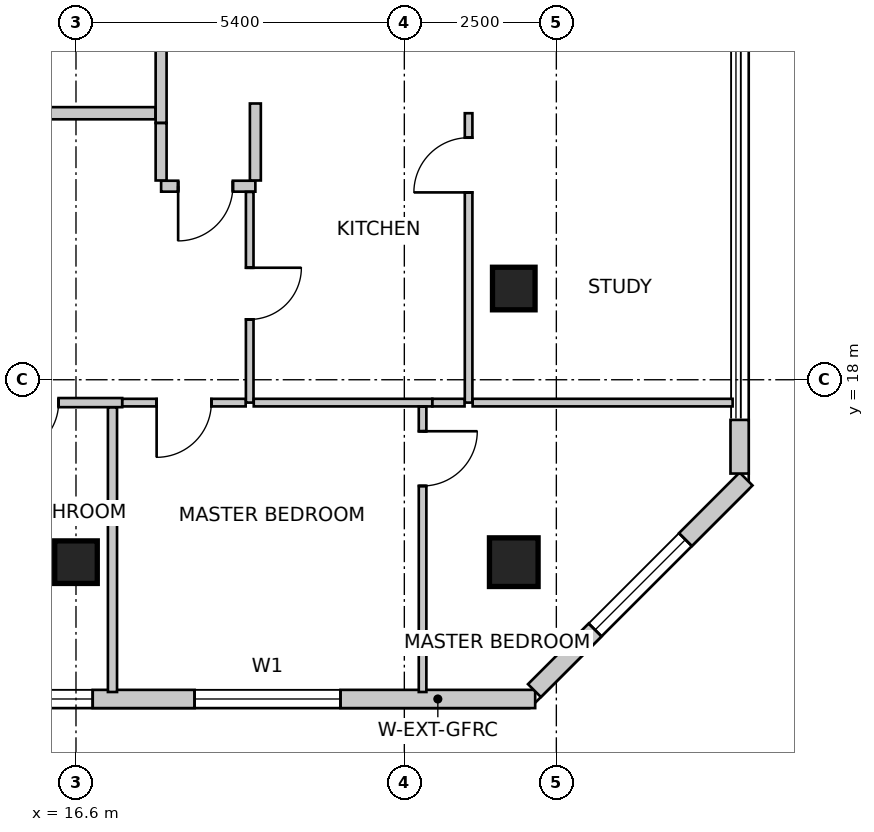
"""IFC4 building model, lengths in metres.
Left out: names, types, materials, properties, quantities, classifications, styles, units other than length and angle.
Written with IfcOpenShell. Run it as: python <this file> out.ifc"""

import sys

from ifc_helpers import new_model, si_unit, direction, frame, frame_2d, origin, origin_2d, place, context, subcontext, project, spatial, rectangle, extrude, source, transform, mapped, element, fill, save


model = new_model("IFC4")
c1 = context("Model", 3, precision=1e-05, world=origin(), true_north=direction((0.0, 1.0)))
c2 = subcontext(c1, "Body", "Model", "MODEL_VIEW")
j1 = project(units=[si_unit("LENGTHUNIT", "METRE"), si_unit("PLANEANGLEUNIT", "RADIAN")], contexts=[c1])
p1 = place(None, origin())
s1 = spatial("IfcSite", under=j1, at=p1, CompositionType="ELEMENT")
p2 = place(p1, origin())
s2 = spatial("IfcBuilding", under=s1, at=p2, CompositionType="ELEMENT")
p3 = place(p2, frame((0.0, 0.0, 221.9)))
s3 = spatial("IfcBuildingStorey", under=s2, at=p3, CompositionType="ELEMENT", Elevation=221.9)
m1 = source(origin(), c2, "Body", "SweptSolid", [
    extrude(rectangle(XDim=0.7, YDim=0.7, at=origin_2d()), origin(), (0.0, 0.0, 1.0), 3.5),
])
p4 = place(p3, frame((23.8, 19.5, 0.0), z_axis=(0.0, 0.0, 1.0), x_axis=(1.0, 0.0, 0.0)))
e1 = element("IfcColumn", 1, at=p4, inside=s3, PredefinedType="COLUMN", context=c2, shape_type="MappedRepresentation", body=[
    mapped(m1, transform((0.0, 0.0, 0.0), scale=1.0)),
])
m2 = source(origin(), c2, "Body", "SweptSolid", [
    extrude(rectangle(XDim=0.8, YDim=0.8, at=origin_2d()), origin(), (0.0, 0.0, 1.0), 3.5),
])
p5 = place(p3, frame((23.8, 15.0, 0.0), z_axis=(0.0, 0.0, 1.0), x_axis=(1.0, 0.0, 0.0)))
e2 = element("IfcColumn", 2, at=p5, inside=s3, PredefinedType="COLUMN", context=c2, shape_type="MappedRepresentation", body=[
    mapped(m2, transform((0.0, 0.0, 0.0), scale=1.0)),
])
p6 = place(p3, frame((16.6, 15.0, 0.0), z_axis=(0.0, 0.0, 1.0), x_axis=(1.0, 0.0, 0.0)))
e3 = element("IfcColumn", 3, at=p6, inside=s3, PredefinedType="COLUMN", context=c2, shape_type="MappedRepresentation", body=[
    mapped(m1, transform((0.0, 0.0, 0.0), scale=1.0)),
])
p7 = place(p3, frame((13.51, 12.75, 0.0), z_axis=(0.0, 0.0, 1.0), x_axis=(1.0, 0.0, 0.0)))
e4 = element("IfcWall", 4, at=p7, inside=s3, PredefinedType="SOLIDWALL", context=c2, shape_type="SweptSolid", body=[
    extrude(rectangle(XDim=10.642, YDim=0.3, at=frame_2d((5.321, 0.0))), origin(), (0.0, 0.0, 1.0), 3.25),
])
m3 = source(origin(), c2, "Body", "SweptSolid", [
    extrude(rectangle(XDim=2.1, YDim=2.0, at=frame_2d((1.05, 1.0))), frame((0.0, 0.16, 0.0), z_axis=(0.0, -1.0, 0.0), x_axis=(1.0, 0.0, 0.0)), (0.0, 0.0, 1.0), 0.32),
])
p8 = place(p7, frame((1.265, 0.0, 0.85)))
e5 = element("IfcOpeningElement", 5, at=p8, cuts=e4, PredefinedType="OPENING", context=c2, shape_type="MappedRepresentation", body=[
    mapped(m3, transform((0.0, 0.0, 0.0), scale=1.0)),
])
m4 = source(origin(), c2, "Body", "SweptSolid", [
    extrude(rectangle(XDim=2.4, YDim=2.2, at=frame_2d((1.2, 1.1))), frame((0.0, 0.16, 0.0), z_axis=(0.0, -1.0, 0.0), x_axis=(1.0, 0.0, 0.0)), (0.0, 0.0, 1.0), 0.32),
])
p9 = place(p7, frame((5.04, 0.0, 0.85)))
e6 = element("IfcOpeningElement", 6, at=p9, cuts=e4, PredefinedType="OPENING", context=c2, shape_type="MappedRepresentation", body=[
    mapped(m4, transform((0.0, 0.0, 0.0), scale=1.0)),
])
p10 = place(p3, frame((24.14, 12.888, 0.0), z_axis=(0.0, 0.0, 1.0), x_axis=(0.707106781187, 0.707106781187, 0.0)))
e7 = element("IfcWall", 7, at=p10, inside=s3, PredefinedType="SOLIDWALL", context=c2, shape_type="SweptSolid", body=[
    extrude(rectangle(XDim=4.922, YDim=0.3, at=frame_2d((2.461, 0.0))), origin(), (0.0, 0.0, 1.0), 3.25),
])
p11 = place(p10, frame((1.411, 0.0, 0.85)))
e8 = element("IfcOpeningElement", 8, at=p11, cuts=e7, PredefinedType="OPENING", context=c2, shape_type="MappedRepresentation", body=[
    mapped(m3, transform((0.0, 0.0, 0.0), scale=1.0)),
])
p12 = place(p3, frame((27.514, 16.457, 0.0), z_axis=(0.0, 0.0, 1.0), x_axis=(0.0, 1.0, 0.0)))
e9 = element("IfcWall", 9, at=p12, inside=s3, PredefinedType="SOLIDWALL", context=c2, shape_type="SweptSolid", body=[
    extrude(rectangle(XDim=0.882, YDim=0.3, at=frame_2d((0.441, 0.0))), origin(), (0.0, 0.0, 1.0), 3.25),
])
p13 = place(p3, frame((18.0, 22.223, 0.0), z_axis=(0.0, 0.0, 1.0), x_axis=(0.0, 1.0, 0.0)))
e10 = element("IfcWall", 10, at=p13, inside=s3, PredefinedType="PARTITIONING", context=c2, shape_type="SweptSolid", body=[
    extrude(rectangle(XDim=5.079, YDim=0.18, at=frame_2d((2.54, 0.0))), origin(), (0.0, 0.0, 1.0), 2.766),
])
m5 = source(origin(), c2, "Body", "SweptSolid", [
    extrude(rectangle(XDim=0.9, YDim=2.15, at=frame_2d((0.45, 1.075))), frame((0.0, 0.1, 0.0), z_axis=(0.0, -1.0, 0.0), x_axis=(1.0, 0.0, 0.0)), (0.0, 0.0, 1.0), 0.2),
])
p14 = place(p13, frame((2.09, 0.0, 0.0)))
e11 = element("IfcOpeningElement", 11, at=p14, cuts=e10, PredefinedType="OPENING", context=c2, shape_type="MappedRepresentation", body=[
    mapped(m5, transform((0.0, 0.0, 0.0), scale=1.0)),
])
p15 = place(p3, frame((19.55, 21.183, 0.0), z_axis=(0.0, 0.0, 1.0), x_axis=(-1.0, 0.0, 0.0)))
e12 = element("IfcWall", 12, at=p15, inside=s3, PredefinedType="PARTITIONING", context=c2, shape_type="SweptSolid", body=[
    extrude(rectangle(XDim=1.55, YDim=0.18, at=frame_2d((0.775, 0.0))), origin(), (0.0, 0.0, 1.0), 2.822),
])
p16 = place(p15, frame((0.37, 0.0, 0.0)))
e13 = element("IfcOpeningElement", 13, at=p16, cuts=e12, PredefinedType="OPENING", context=c2, shape_type="MappedRepresentation", body=[
    mapped(m5, transform((0.0, 0.0, 0.0), scale=1.0)),
])
p17 = place(p3, frame((18.0, 21.277, 0.0), z_axis=(0.0, 0.0, 1.0), x_axis=(0.0, 1.0, 0.0)))
e14 = element("IfcWall", 14, at=p17, inside=s3, PredefinedType="PARTITIONING", context=c2, shape_type="SweptSolid", body=[
    extrude(rectangle(XDim=0.944, YDim=0.18, at=frame_2d((0.472, 0.0))), origin(), (0.0, 0.0, 1.0), 2.822),
])
p18 = place(p3, frame((19.55, 22.543, 0.0), z_axis=(0.0, 0.0, 1.0), x_axis=(0.0, -1.0, 0.0)))
e15 = element("IfcWall", 15, at=p18, inside=s3, PredefinedType="PARTITIONING", context=c2, shape_type="SweptSolid", body=[
    extrude(rectangle(XDim=1.266, YDim=0.18, at=frame_2d((0.633, 0.0))), origin(), (0.0, 0.0, 1.0), 3.25),
])
p19 = place(p3, frame((17.906, 22.383, 0.0), z_axis=(0.0, 0.0, 1.0), x_axis=(-1.0, 0.0, 0.0)))
e16 = element("IfcWall", 16, at=p19, inside=s3, PredefinedType="PARTITIONING", context=c2, shape_type="SweptSolid", body=[
    extrude(rectangle(XDim=5.948, YDim=0.2, at=frame_2d((2.974, 0.0))), origin(), (0.0, 0.0, 1.0), 2.822),
])
p20 = place(p3, frame((23.057, 17.624, 0.0), z_axis=(0.0, 0.0, 1.0), x_axis=(0.0, 1.0, 0.0)))
e17 = element("IfcWall", 17, at=p20, inside=s3, PredefinedType="PARTITIONING", context=c2, shape_type="SweptSolid", body=[
    extrude(rectangle(XDim=4.759, YDim=0.125, at=frame_2d((2.379, 0.0))), origin(), (0.0, 0.0, 1.0), 2.822),
])
m6 = source(origin(), c2, "Body", "SweptSolid", [
    extrude(rectangle(XDim=0.9, YDim=2.15, at=frame_2d((0.45, 1.075))), frame((0.0, 0.073, 0.0), z_axis=(0.0, -1.0, 0.0), x_axis=(1.0, 0.0, 0.0)), (0.0, 0.0, 1.0), 0.145),
])
p21 = place(p20, frame((3.457, 0.0, 0.0)))
e18 = element("IfcOpeningElement", 18, at=p21, cuts=e17, PredefinedType="OPENING", context=c2, shape_type="MappedRepresentation", body=[
    mapped(m6, transform((0.0, 0.0, 0.0), scale=1.0)),
])
p22 = place(p3, frame((27.399, 17.624, 0.0), z_axis=(0.0, 0.0, 1.0), x_axis=(-1.0, 0.0, 0.0)))
e19 = element("IfcWall", 19, at=p22, inside=s3, PredefinedType="PARTITIONING", context=c2, shape_type="SweptSolid", body=[
    extrude(rectangle(XDim=4.275, YDim=0.125, at=frame_2d((2.138, 0.0))), origin(), (0.0, 0.0, 1.0), 2.542),
])
p23 = place(p3, frame((19.457, 21.089, 0.0), z_axis=(0.0, 0.0, 1.0), x_axis=(0.0, -1.0, 0.0)))
e20 = element("IfcWall", 20, at=p23, inside=s3, PredefinedType="PARTITIONING", context=c2, shape_type="SweptSolid", body=[
    extrude(rectangle(XDim=3.465, YDim=0.125, at=frame_2d((1.732, 0.0))), origin(), (0.0, 0.0, 1.0), 2.822),
])
m7 = source(origin(), c2, "Body", "SweptSolid", [
    extrude(rectangle(XDim=0.85, YDim=2.15, at=frame_2d((0.425, 1.075))), frame((0.0, 0.073, 0.0), z_axis=(0.0, -1.0, 0.0), x_axis=(1.0, 0.0, 0.0)), (0.0, 0.0, 1.0), 0.145),
])
p24 = place(p23, frame((1.247, 0.0, 0.0)))
e21 = element("IfcOpeningElement", 21, at=p24, cuts=e20, PredefinedType="OPENING", context=c2, shape_type="MappedRepresentation", body=[
    mapped(m7, transform((0.0, 0.0, 0.0), scale=1.0)),
])
p25 = place(p3, frame((17.36, 17.624, 0.0), z_axis=(0.0, 0.0, 1.0), x_axis=(-1.0, 0.0, 0.0)))
e22 = element("IfcWall", 22, at=p25, inside=s3, PredefinedType="PARTITIONING", context=c2, shape_type="SweptSolid", body=[
    extrude(rectangle(XDim=3.07, YDim=0.15, at=frame_2d((1.535, 0.0))), origin(), (0.0, 0.0, 1.0), 3.25),
])
m8 = source(origin(), c2, "Body", "SweptSolid", [
    extrude(rectangle(XDim=0.85, YDim=2.15, at=frame_2d((0.425, 1.075))), frame((0.0, 0.085, 0.0), z_axis=(0.0, -1.0, 0.0), x_axis=(1.0, 0.0, 0.0)), (0.0, 0.0, 1.0), 0.17),
])
p26 = place(p25, frame((1.046, 0.0, 0.0)))
e23 = element("IfcOpeningElement", 23, at=p26, cuts=e22, PredefinedType="OPENING", context=c2, shape_type="MappedRepresentation", body=[
    mapped(m8, transform((0.0, 0.0, 0.0), scale=1.0)),
])
p27 = place(p3, frame((19.39, 17.624, 0.0), z_axis=(0.0, 0.0, 1.0), x_axis=(-1.0, 0.0, 0.0)))
e24 = element("IfcWall", 24, at=p27, inside=s3, PredefinedType="PARTITIONING", context=c2, shape_type="SweptSolid", body=[
    extrude(rectangle(XDim=2.028, YDim=0.125, at=frame_2d((1.014, 0.0))), origin(), (0.0, 0.0, 1.0), 3.25),
])
p28 = place(p27, frame((0.564, 0.0, 0.0)))
e25 = element("IfcOpeningElement", 25, at=p28, cuts=e24, PredefinedType="OPENING", context=c2, shape_type="MappedRepresentation", body=[
    mapped(m6, transform((0.0, 0.0, 0.0), scale=1.0)),
])
p29 = place(p3, frame((22.46, 17.624, 0.0), z_axis=(0.0, 0.0, 1.0), x_axis=(-1.0, 0.0, 0.0)))
e26 = element("IfcWall", 26, at=p29, inside=s3, PredefinedType="PARTITIONING", context=c2, shape_type="SweptSolid", body=[
    extrude(rectangle(XDim=2.937, YDim=0.125, at=frame_2d((1.468, 0.0))), origin(), (0.0, 0.0, 1.0), 2.822),
])
p30 = place(p3, frame((22.99, 17.624, 0.0), z_axis=(0.0, 0.0, 1.0), x_axis=(-1.0, 0.0, 0.0)))
e27 = element("IfcWall", 27, at=p30, inside=s3, PredefinedType="PARTITIONING", context=c2, shape_type="SweptSolid", body=[
    extrude(rectangle(XDim=0.529, YDim=0.125, at=frame_2d((0.264, 0.0))), origin(), (0.0, 0.0, 1.0), 3.25),
])
p31 = place(p3, frame((17.2, 17.545, 0.0), z_axis=(0.0, 0.0, 1.0), x_axis=(0.0, -1.0, 0.0)))
e28 = element("IfcWall", 28, at=p31, inside=s3, PredefinedType="PARTITIONING", context=c2, shape_type="SweptSolid", body=[
    extrude(rectangle(XDim=4.68, YDim=0.15, at=frame_2d((2.34, 0.0))), origin(), (0.0, 0.0, 1.0), 2.542),
])
p32 = place(p3, frame((22.3, 17.558, 0.0), z_axis=(0.0, 0.0, 1.0), x_axis=(0.0, -1.0, 0.0)))
e29 = element("IfcWall", 29, at=p32, inside=s3, PredefinedType="PARTITIONING", context=c2, shape_type="SweptSolid", body=[
    extrude(rectangle(XDim=4.693, YDim=0.125, at=frame_2d((2.346, 0.0))), origin(), (0.0, 0.0, 1.0), 2.542),
])
p33 = place(p32, frame((0.404, 0.0, 0.0)))
e30 = element("IfcOpeningElement", 30, at=p33, cuts=e29, PredefinedType="OPENING", context=c2, shape_type="MappedRepresentation", body=[
    mapped(m6, transform((0.0, 0.0, 0.0), scale=1.0)),
])
m9 = source(origin(), c2, "Body", "SweptSolid", [
    extrude(rectangle(XDim=2.1, YDim=2.0, at=frame_2d((1.05, 1.0))), frame((0.0, -0.015, 0.0), z_axis=(0.0, -1.0, 0.0), x_axis=(1.0, 0.0, 0.0)), (0.0, 0.0, 1.0), 0.06),
])
p34 = place(p8, origin())
e31 = element("IfcWindow", 31, at=p34, inside=s3, PartitioningType="SINGLE_PANEL", PredefinedType="WINDOW", context=c2, shape_type="MappedRepresentation", body=[
    mapped(m9, transform((0.0, 0.0, 0.0), scale=1.0)),
])
fill(e5, e31)
m10 = source(origin(), c2, "Body", "SweptSolid", [
    extrude(rectangle(XDim=2.4, YDim=2.2, at=frame_2d((1.2, 1.1))), frame((0.0, -0.015, 0.0), z_axis=(0.0, -1.0, 0.0), x_axis=(1.0, 0.0, 0.0)), (0.0, 0.0, 1.0), 0.06),
])
p35 = place(p9, origin())
e32 = element("IfcWindow", 32, at=p35, inside=s3, PartitioningType="SINGLE_PANEL", PredefinedType="WINDOW", context=c2, shape_type="MappedRepresentation", body=[
    mapped(m10, transform((0.0, 0.0, 0.0), scale=1.0)),
])
fill(e6, e32)
p36 = place(p11, origin())
e33 = element("IfcWindow", 33, at=p36, inside=s3, PartitioningType="SINGLE_PANEL", PredefinedType="WINDOW", context=c2, shape_type="MappedRepresentation", body=[
    mapped(m9, transform((0.0, 0.0, 0.0), scale=1.0)),
])
fill(e8, e33)
m11 = source(origin(), c2, "Body", "SweptSolid", [
    extrude(rectangle(XDim=0.9, YDim=2.15, at=frame_2d((0.45, 1.075))), frame((0.0, 0.025, 0.0), z_axis=(0.0, -1.0, 0.0), x_axis=(1.0, 0.0, 0.0)), (0.0, 0.0, 1.0), 0.05),
])
p37 = place(p21, origin())
e34 = element("IfcDoor", 34, at=p37, inside=s3, OperationType="SINGLE_SWING_LEFT", PredefinedType="DOOR", context=c2, shape_type="MappedRepresentation", body=[
    mapped(m11, transform((0.0, 0.0, 0.0), scale=1.0)),
])
fill(e18, e34)
m12 = source(origin(), c2, "Body", "SweptSolid", [
    extrude(rectangle(XDim=0.9, YDim=2.15, at=frame_2d((0.45, 1.075))), frame((0.0, 0.025, 0.0), z_axis=(0.0, -1.0, 0.0), x_axis=(1.0, 0.0, 0.0)), (0.0, 0.0, 1.0), 0.05),
])
p38 = place(p16, origin())
e35 = element("IfcDoor", 35, at=p38, inside=s3, OperationType="SINGLE_SWING_RIGHT", PredefinedType="DOOR", context=c2, shape_type="MappedRepresentation", body=[
    mapped(m12, transform((0.0, 0.0, 0.0), scale=1.0)),
])
fill(e13, e35)
m13 = source(origin(), c2, "Body", "SweptSolid", [
    extrude(rectangle(XDim=0.85, YDim=2.15, at=frame_2d((0.425, 1.075))), frame((0.0, 0.025, 0.0), z_axis=(0.0, -1.0, 0.0), x_axis=(1.0, 0.0, 0.0)), (0.0, 0.0, 1.0), 0.05),
])
p39 = place(p24, origin())
e36 = element("IfcDoor", 36, at=p39, inside=s3, OperationType="SINGLE_SWING_LEFT", PredefinedType="DOOR", context=c2, shape_type="MappedRepresentation", body=[
    mapped(m13, transform((0.0, 0.0, 0.0), scale=1.0)),
])
fill(e21, e36)
p40 = place(p26, origin())
e37 = element("IfcDoor", 37, at=p40, inside=s3, OperationType="SINGLE_SWING_RIGHT", PredefinedType="DOOR", context=c2, shape_type="MappedRepresentation", body=[
    mapped(m13, transform((0.0, 0.0, 0.0), scale=1.0)),
])
fill(e23, e37)
p41 = place(p28, origin())
e38 = element("IfcDoor", 38, at=p41, inside=s3, OperationType="SINGLE_SWING_RIGHT", PredefinedType="DOOR", context=c2, shape_type="MappedRepresentation", body=[
    mapped(m11, transform((0.0, 0.0, 0.0), scale=1.0)),
])
fill(e25, e38)
p42 = place(p33, origin())
e39 = element("IfcDoor", 39, at=p42, inside=s3, OperationType="SINGLE_SWING_LEFT", PredefinedType="DOOR", context=c2, shape_type="MappedRepresentation", body=[
    mapped(m11, transform((0.0, 0.0, 0.0), scale=1.0)),
])
fill(e30, e39)
save(model, sys.argv[1])
